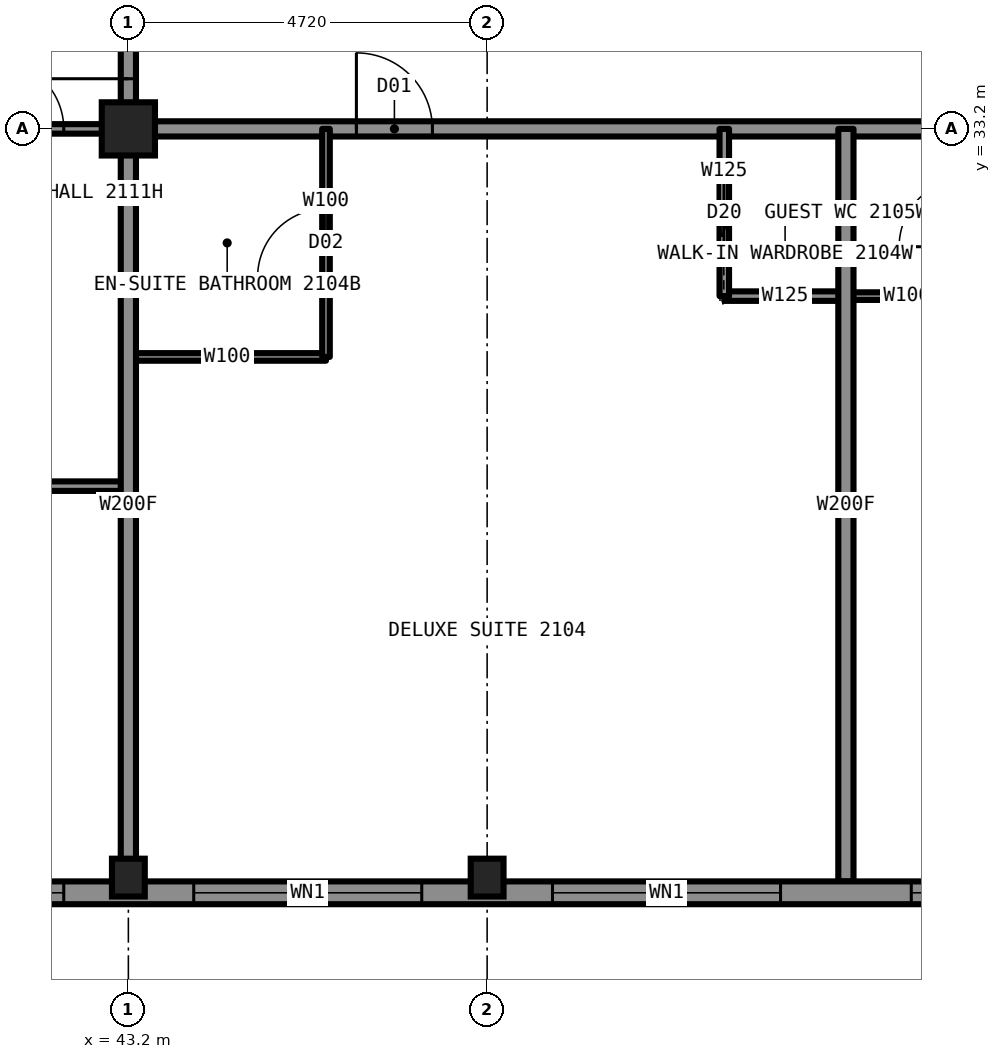
"""IFC4 building model, lengths in metres.
Left out: names, types, materials, properties, quantities, classifications, styles, units other than length and angle.
Written with IfcOpenShell. Run it as: python <this file> out.ifc"""

import sys

from ifc_helpers import new_model, si_unit, direction, frame, frame_2d, origin, origin_2d, place, context, subcontext, project, spatial, rectangle, hollow_rectangle, i_section, extrude, element, fill, save


model = new_model("IFC4")
c1 = context("Model", 3, precision=1e-05, world=origin(), true_north=direction((0.0, 1.0)))
c2 = subcontext(c1, "Body", "Model", "MODEL_VIEW")
j1 = project(units=[si_unit("LENGTHUNIT", "METRE"), si_unit("PLANEANGLEUNIT", "RADIAN")], contexts=[c1])
p1 = place(None, origin())
s1 = spatial("IfcSite", under=j1, at=p1, CompositionType="ELEMENT")
p2 = place(p1, origin())
s2 = spatial("IfcBuilding", under=s1, at=p2, CompositionType="ELEMENT")
p3 = place(p2, frame((0.0, 0.0, 81.0)))
s3 = spatial("IfcBuildingStorey", under=s2, at=p3, CompositionType="ELEMENT", Elevation=81.0)
for number, where, z_axis, x_axis in (
    (1, (43.2, 23.35, 0.0), (0.0, 0.0, 1.0), (1.0, 0.0, 0.0)),
    (2, (47.92, 23.35, 0.0), (0.0, 0.0, 1.0), (1.0, 0.0, 0.0)),
):
    element("IfcColumn", number, at=place(p3, frame(where, z_axis=z_axis, x_axis=x_axis)), inside=s3, PredefinedType="COLUMN", context=c2, shape_type="SweptSolid", body=[
        extrude(i_section(OverallWidth=0.432, OverallDepth=0.498, WebThickness=0.056, FlangeThickness=0.089, at=origin_2d()), origin(), (0.0, 0.0, 1.0), 3.5),
    ])
p4 = place(p3, frame((43.2, 33.2, 0.0), z_axis=(0.0, 0.0, 1.0), x_axis=(1.0, 0.0, 0.0)))
e3 = element("IfcColumn", 3, at=p4, inside=s3, PredefinedType="COLUMN", context=c2, shape_type="SweptSolid", body=[
    extrude(hollow_rectangle(XDim=0.7, YDim=0.7, WallThickness=0.06, at=origin_2d()), origin(), (0.0, 0.0, 1.0), 3.5),
])
p5 = place(p3, frame((43.2, 33.2, 0.0), z_axis=(0.0, 0.0, 1.0), x_axis=(1.0, 0.0, 0.0)))
e4 = element("IfcWall", 4, at=p5, inside=s3, PredefinedType="PARTITIONING", context=c2, shape_type="SweptSolid", body=[
    extrude(rectangle(XDim=23.6, YDim=0.2, at=frame_2d((11.8, 0.0))), origin(), (0.0, 0.0, 1.0), 3.33),
])
p6 = place(p5, frame((3.0, 0.0, 0.0)))
e5 = element("IfcOpeningElement", 5, at=p6, cuts=e4, PredefinedType="OPENING", context=c2, shape_type="SweptSolid", body=[
    extrude(rectangle(XDim=1.0, YDim=2.2, at=frame_2d((0.5, 1.1))), frame((0.0, 0.11, 0.0), z_axis=(0.0, -1.0, 0.0), x_axis=(1.0, 0.0, 0.0)), (0.0, 0.0, 1.0), 0.22),
])
p7 = place(p5, frame((11.29, 0.0, 0.0)))
e6 = element("IfcOpeningElement", 6, at=p7, cuts=e4, PredefinedType="OPENING", context=c2, shape_type="SweptSolid", body=[
    extrude(rectangle(XDim=1.1, YDim=2.2, at=frame_2d((0.55, 1.1))), frame((0.0, 0.11, 0.0), z_axis=(0.0, -1.0, 0.0), x_axis=(1.0, 0.0, 0.0)), (0.0, 0.0, 1.0), 0.22),
])
p8 = place(p3, frame((33.3, 33.2, 0.0), z_axis=(0.0, 0.0, 1.0), x_axis=(1.0, 0.0, 0.0)))
e7 = element("IfcWall", 7, at=p8, inside=s3, PredefinedType="PARTITIONING", context=c2, shape_type="SweptSolid", body=[
    extrude(rectangle(XDim=9.9, YDim=0.125, at=frame_2d((4.95, 0.0))), origin(), (0.0, 0.0, 1.0), 2.573),
])
p9 = place(p8, frame((8.15, 0.0, 0.0)))
e8 = element("IfcOpeningElement", 8, at=p9, cuts=e7, PredefinedType="OPENING", context=c2, shape_type="SweptSolid", body=[
    extrude(rectangle(XDim=0.9, YDim=2.2, at=frame_2d((0.45, 1.1))), frame((0.0, 0.073, 0.0), z_axis=(0.0, -1.0, 0.0), x_axis=(1.0, 0.0, 0.0)), (0.0, 0.0, 1.0), 0.145),
])
p10 = place(p3, frame((52.64, 31.0, 0.0), z_axis=(0.0, 0.0, 1.0), x_axis=(1.0, 0.0, 0.0)))
e9 = element("IfcWall", 9, at=p10, inside=s3, PredefinedType="PARTITIONING", context=c2, shape_type="SweptSolid", body=[
    extrude(rectangle(XDim=1.6, YDim=0.1, at=frame_2d((0.8, 0.0))), origin(), (0.0, 0.0, 1.0), 3.33),
])
p11 = place(p3, frame((51.04, 31.0, 0.0), z_axis=(0.0, 0.0, 1.0), x_axis=(1.0, 0.0, 0.0)))
e10 = element("IfcWall", 10, at=p11, inside=s3, PredefinedType="PARTITIONING", context=c2, shape_type="SweptSolid", body=[
    extrude(rectangle(XDim=1.6, YDim=0.125, at=frame_2d((0.8, 0.0))), origin(), (0.0, 0.0, 1.0), 3.33),
])
p12 = place(p3, frame((43.2, 30.2, 0.0), z_axis=(0.0, 0.0, 1.0), x_axis=(1.0, 0.0, 0.0)))
e11 = element("IfcWall", 11, at=p12, inside=s3, PredefinedType="PARTITIONING", context=c2, shape_type="SweptSolid", body=[
    extrude(rectangle(XDim=2.6, YDim=0.1, at=frame_2d((1.3, 0.0))), origin(), (0.0, 0.0, 1.0), 3.33),
])
p13 = place(p3, frame((33.306, 28.5, 0.0), z_axis=(0.0, 0.0, 1.0), x_axis=(1.0, 0.0, 0.0)))
e12 = element("IfcWall", 12, at=p13, inside=s3, PredefinedType="PARTITIONING", context=c2, shape_type="SweptSolid", body=[
    extrude(rectangle(XDim=9.894, YDim=0.125, at=frame_2d((4.947, 0.0))), origin(), (0.0, 0.0, 1.0), 3.33),
])
p14 = place(p13, frame((7.244, 0.0, 0.0)))
e13 = element("IfcOpeningElement", 13, at=p14, cuts=e12, PredefinedType="OPENING", context=c2, shape_type="SweptSolid", body=[
    extrude(rectangle(XDim=0.9, YDim=2.2, at=frame_2d((0.45, 1.1))), frame((0.0, 0.073, 0.0), z_axis=(0.0, -1.0, 0.0), x_axis=(1.0, 0.0, 0.0)), (0.0, 0.0, 1.0), 0.145),
])
p15 = place(p3, frame((43.2, 33.2, 0.0), z_axis=(0.0, 0.0, 1.0), x_axis=(0.0, 1.0, 0.0)))
e14 = element("IfcWall", 14, at=p15, inside=s3, PredefinedType="PARTITIONING", context=c2, shape_type="SweptSolid", body=[
    extrude(rectangle(XDim=4.72, YDim=0.2, at=frame_2d((2.36, 0.0))), origin(), (0.0, 0.0, 1.0), 3.33),
])
p16 = place(p15, frame((0.66, 0.0, 0.0)))
e15 = element("IfcOpeningElement", 15, at=p16, cuts=e14, PredefinedType="OPENING", context=c2, shape_type="SweptSolid", body=[
    extrude(rectangle(XDim=1.1, YDim=2.2, at=frame_2d((0.55, 1.1))), frame((0.0, 0.11, 0.0), z_axis=(0.0, -1.0, 0.0), x_axis=(1.0, 0.0, 0.0)), (0.0, 0.0, 1.0), 0.22),
])
p17 = place(p3, frame((43.2, 23.3, 0.0), z_axis=(0.0, 0.0, 1.0), x_axis=(0.0, 1.0, 0.0)))
e16 = element("IfcWall", 16, at=p17, inside=s3, PredefinedType="PARTITIONING", context=c2, shape_type="SweptSolid", body=[
    extrude(rectangle(XDim=9.9, YDim=0.2, at=frame_2d((4.95, 0.0))), origin(), (0.0, 0.0, 1.0), 2.573),
])
p18 = place(p3, frame((52.64, 23.3, 0.0), z_axis=(0.0, 0.0, 1.0), x_axis=(0.0, 1.0, 0.0)))
e17 = element("IfcWall", 17, at=p18, inside=s3, PredefinedType="PARTITIONING", context=c2, shape_type="SweptSolid", body=[
    extrude(rectangle(XDim=9.9, YDim=0.2, at=frame_2d((4.95, 0.0))), origin(), (0.0, 0.0, 1.0), 3.33),
])
p19 = place(p3, frame((51.04, 31.0, 0.0), z_axis=(0.0, 0.0, 1.0), x_axis=(0.0, 1.0, 0.0)))
e18 = element("IfcWall", 18, at=p19, inside=s3, PredefinedType="PARTITIONING", context=c2, shape_type="SweptSolid", body=[
    extrude(rectangle(XDim=2.2, YDim=0.125, at=frame_2d((1.1, 0.0))), origin(), (0.0, 0.0, 1.0), 3.33),
])
p20 = place(p19, frame((0.7, 0.0, 0.0)))
e19 = element("IfcOpeningElement", 19, at=p20, cuts=e18, PredefinedType="OPENING", context=c2, shape_type="SweptSolid", body=[
    extrude(rectangle(XDim=0.8, YDim=2.1, at=frame_2d((0.4, 1.05))), frame((0.0, 0.073, 0.0), z_axis=(0.0, -1.0, 0.0), x_axis=(1.0, 0.0, 0.0)), (0.0, 0.0, 1.0), 0.145),
])
p21 = place(p3, frame((45.8, 30.2, 0.0), z_axis=(0.0, 0.0, 1.0), x_axis=(0.0, 1.0, 0.0)))
e20 = element("IfcWall", 20, at=p21, inside=s3, PredefinedType="PARTITIONING", context=c2, shape_type="SweptSolid", body=[
    extrude(rectangle(XDim=3.0, YDim=0.1, at=frame_2d((1.5, 0.0))), origin(), (0.0, 0.0, 1.0), 3.33),
])
p22 = place(p21, frame((1.05, 0.0, 0.0)))
e21 = element("IfcOpeningElement", 21, at=p22, cuts=e20, PredefinedType="OPENING", context=c2, shape_type="SweptSolid", body=[
    extrude(rectangle(XDim=0.9, YDim=2.1, at=frame_2d((0.45, 1.05))), frame((0.0, 0.06, 0.0), z_axis=(0.0, -1.0, 0.0), x_axis=(1.0, 0.0, 0.0)), (0.0, 0.0, 1.0), 0.12),
])
p23 = place(p3, frame((38.5, 23.15, 0.0), z_axis=(0.0, 0.0, 1.0), x_axis=(1.0, 0.0, 0.0)))
e22 = element("IfcWall", 22, at=p23, inside=s3, PredefinedType="SOLIDWALL", context=c2, shape_type="SweptSolid", body=[
    extrude(rectangle(XDim=33.0, YDim=0.3, at=frame_2d((16.5, 0.0))), origin(), (0.0, 0.0, 1.0), 2.63),
])
p24 = place(p23, frame((0.85, 0.0, 0.5)))
e23 = element("IfcOpeningElement", 23, at=p24, cuts=e22, PredefinedType="OPENING", context=c2, shape_type="SweptSolid", body=[
    extrude(rectangle(XDim=3.0, YDim=2.0, at=frame_2d((1.5, 1.0))), frame((0.0, 0.16, 0.0), z_axis=(0.0, -1.0, 0.0), x_axis=(1.0, 0.0, 0.0)), (0.0, 0.0, 1.0), 0.32),
])
p25 = place(p23, frame((5.56, 0.0, 0.5)))
e24 = element("IfcOpeningElement", 24, at=p25, cuts=e22, PredefinedType="OPENING", context=c2, shape_type="SweptSolid", body=[
    extrude(rectangle(XDim=3.0, YDim=2.0, at=frame_2d((1.5, 1.0))), frame((0.0, 0.16, 0.0), z_axis=(0.0, -1.0, 0.0), x_axis=(1.0, 0.0, 0.0)), (0.0, 0.0, 1.0), 0.32),
])
p26 = place(p23, frame((10.28, 0.0, 0.5)))
e25 = element("IfcOpeningElement", 25, at=p26, cuts=e22, PredefinedType="OPENING", context=c2, shape_type="SweptSolid", body=[
    extrude(rectangle(XDim=3.0, YDim=2.0, at=frame_2d((1.5, 1.0))), frame((0.0, 0.16, 0.0), z_axis=(0.0, -1.0, 0.0), x_axis=(1.0, 0.0, 0.0)), (0.0, 0.0, 1.0), 0.32),
])
p27 = place(p23, frame((15.0, 0.0, 0.5)))
e26 = element("IfcOpeningElement", 26, at=p27, cuts=e22, PredefinedType="OPENING", context=c2, shape_type="SweptSolid", body=[
    extrude(rectangle(XDim=3.0, YDim=2.0, at=frame_2d((1.5, 1.0))), frame((0.0, 0.16, 0.0), z_axis=(0.0, -1.0, 0.0), x_axis=(1.0, 0.0, 0.0)), (0.0, 0.0, 1.0), 0.32),
])
p28 = place(p23, frame((19.72, 0.0, 0.5)))
e27 = element("IfcOpeningElement", 27, at=p28, cuts=e22, PredefinedType="OPENING", context=c2, shape_type="SweptSolid", body=[
    extrude(rectangle(XDim=3.0, YDim=2.0, at=frame_2d((1.5, 1.0))), frame((0.0, 0.16, 0.0), z_axis=(0.0, -1.0, 0.0), x_axis=(1.0, 0.0, 0.0)), (0.0, 0.0, 1.0), 0.32),
])
p29 = place(p23, frame((24.44, 0.0, 0.5)))
e28 = element("IfcOpeningElement", 28, at=p29, cuts=e22, PredefinedType="OPENING", context=c2, shape_type="SweptSolid", body=[
    extrude(rectangle(XDim=3.0, YDim=2.0, at=frame_2d((1.5, 1.0))), frame((0.0, 0.16, 0.0), z_axis=(0.0, -1.0, 0.0), x_axis=(1.0, 0.0, 0.0)), (0.0, 0.0, 1.0), 0.32),
])
p30 = place(p23, frame((29.15, 0.0, 0.5)))
e29 = element("IfcOpeningElement", 29, at=p30, cuts=e22, PredefinedType="OPENING", context=c2, shape_type="SweptSolid", body=[
    extrude(rectangle(XDim=3.0, YDim=2.0, at=frame_2d((1.5, 1.0))), frame((0.0, 0.16, 0.0), z_axis=(0.0, -1.0, 0.0), x_axis=(1.0, 0.0, 0.0)), (0.0, 0.0, 1.0), 0.32),
])
p31 = place(p6, origin())
e30 = element("IfcDoor", 30, at=p31, inside=s3, OperationType="SINGLE_SWING_LEFT", PredefinedType="DOOR", context=c2, shape_type="SweptSolid", body=[
    extrude(rectangle(XDim=1.0, YDim=2.2, at=frame_2d((0.5, 1.1))), frame((0.0, 0.025, 0.0), z_axis=(0.0, -1.0, 0.0), x_axis=(1.0, 0.0, 0.0)), (0.0, 0.0, 1.0), 0.05),
])
fill(e5, e30)
p32 = place(p22, origin())
e31 = element("IfcDoor", 31, at=p32, inside=s3, OperationType="SINGLE_SWING_RIGHT", PredefinedType="DOOR", context=c2, shape_type="SweptSolid", body=[
    extrude(rectangle(XDim=0.9, YDim=2.1, at=frame_2d((0.45, 1.05))), frame((0.0, 0.025, 0.0), z_axis=(0.0, -1.0, 0.0), x_axis=(1.0, 0.0, 0.0)), (0.0, 0.0, 1.0), 0.05),
])
fill(e21, e31)
p33 = place(p20, origin())
e32 = element("IfcDoor", 32, at=p33, inside=s3, OperationType="SLIDING_TO_LEFT", PredefinedType="DOOR", context=c2, shape_type="SweptSolid", body=[
    extrude(rectangle(XDim=0.8, YDim=2.1, at=frame_2d((0.4, 1.05))), frame((0.0, 0.025, 0.0), z_axis=(0.0, -1.0, 0.0), x_axis=(1.0, 0.0, 0.0)), (0.0, 0.0, 1.0), 0.05),
])
fill(e19, e32)
p34 = place(p9, origin())
e33 = element("IfcDoor", 33, at=p34, inside=s3, OperationType="SINGLE_SWING_LEFT", PredefinedType="DOOR", context=c2, shape_type="SweptSolid", body=[
    extrude(rectangle(XDim=0.9, YDim=2.2, at=frame_2d((0.45, 1.1))), frame((0.0, 0.025, 0.0), z_axis=(0.0, -1.0, 0.0), x_axis=(1.0, 0.0, 0.0)), (0.0, 0.0, 1.0), 0.05),
])
fill(e8, e33)
p35 = place(p16, origin())
e34 = element("IfcDoor", 34, at=p35, inside=s3, OperationType="SINGLE_SWING_LEFT", PredefinedType="DOOR", context=c2, shape_type="SweptSolid", body=[
    extrude(rectangle(XDim=1.1, YDim=2.2, at=frame_2d((0.55, 1.1))), frame((0.0, 0.025, 0.0), z_axis=(0.0, -1.0, 0.0), x_axis=(1.0, 0.0, 0.0)), (0.0, 0.0, 1.0), 0.05),
])
fill(e15, e34)
p36 = place(p24, origin())
e35 = element("IfcWindow", 35, at=p36, inside=s3, PartitioningType="SINGLE_PANEL", PredefinedType="WINDOW", context=c2, shape_type="SweptSolid", body=[
    extrude(rectangle(XDim=3.0, YDim=2.0, at=frame_2d((1.5, 1.0))), frame((0.0, 0.03, 0.0), z_axis=(0.0, -1.0, 0.0), x_axis=(1.0, 0.0, 0.0)), (0.0, 0.0, 1.0), 0.06),
])
fill(e23, e35)
p37 = place(p25, origin())
e36 = element("IfcWindow", 36, at=p37, inside=s3, PartitioningType="SINGLE_PANEL", PredefinedType="WINDOW", context=c2, shape_type="SweptSolid", body=[
    extrude(rectangle(XDim=3.0, YDim=2.0, at=frame_2d((1.5, 1.0))), frame((0.0, 0.03, 0.0), z_axis=(0.0, -1.0, 0.0), x_axis=(1.0, 0.0, 0.0)), (0.0, 0.0, 1.0), 0.06),
])
fill(e24, e36)
p38 = place(p26, origin())
e37 = element("IfcWindow", 37, at=p38, inside=s3, PartitioningType="SINGLE_PANEL", PredefinedType="WINDOW", context=c2, shape_type="SweptSolid", body=[
    extrude(rectangle(XDim=3.0, YDim=2.0, at=frame_2d((1.5, 1.0))), frame((0.0, 0.03, 0.0), z_axis=(0.0, -1.0, 0.0), x_axis=(1.0, 0.0, 0.0)), (0.0, 0.0, 1.0), 0.06),
])
fill(e25, e37)
p39 = place(p27, origin())
e38 = element("IfcWindow", 38, at=p39, inside=s3, PartitioningType="SINGLE_PANEL", PredefinedType="WINDOW", context=c2, shape_type="SweptSolid", body=[
    extrude(rectangle(XDim=3.0, YDim=2.0, at=frame_2d((1.5, 1.0))), frame((0.0, 0.03, 0.0), z_axis=(0.0, -1.0, 0.0), x_axis=(1.0, 0.0, 0.0)), (0.0, 0.0, 1.0), 0.06),
])
fill(e26, e38)
save(model, sys.argv[1])
